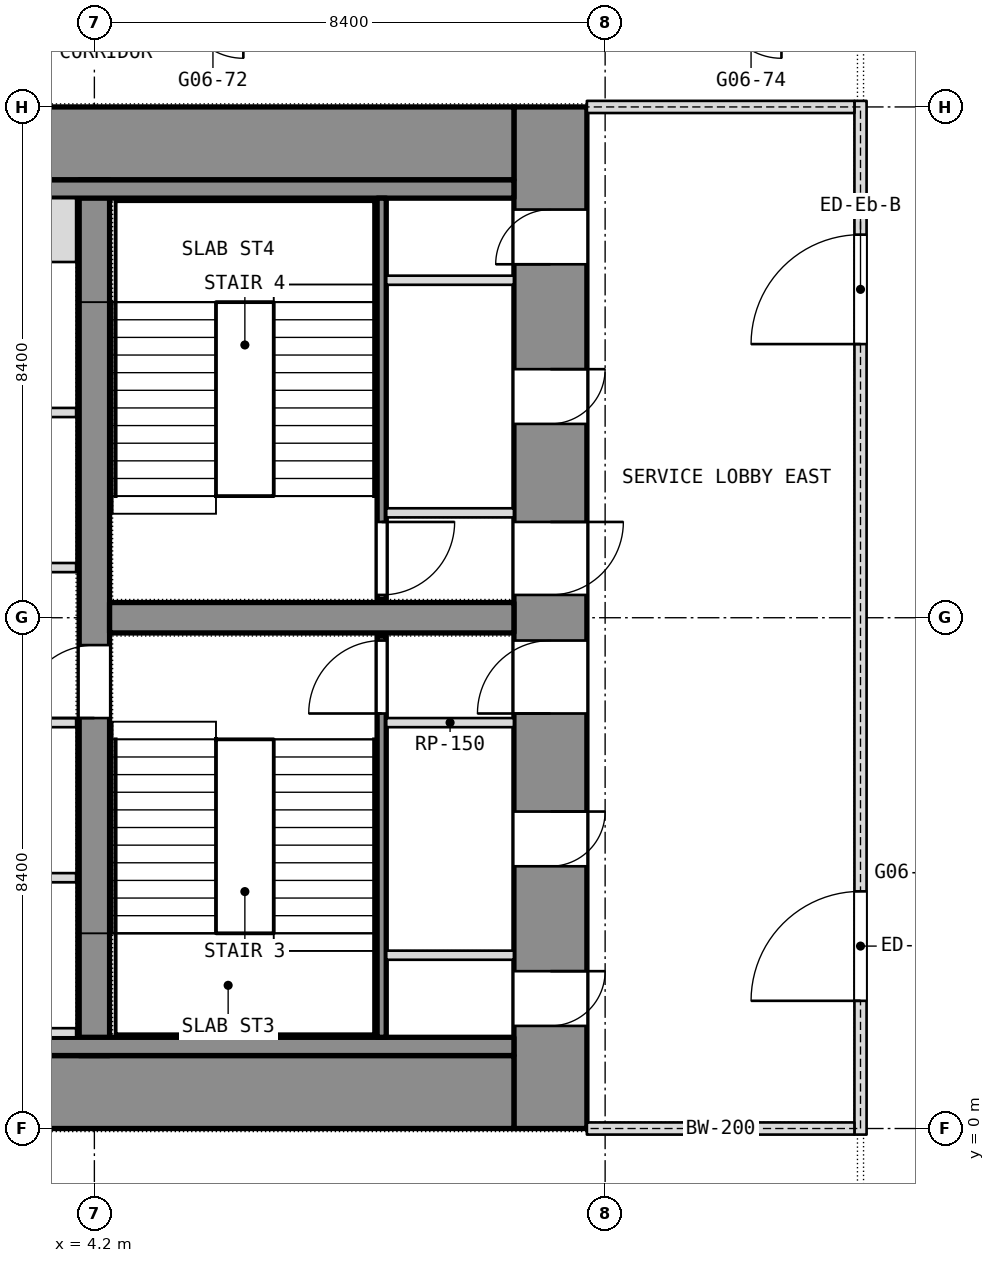
"""IFC4 building model, lengths in metres.
Left out: names, types, materials, properties, quantities, classifications, styles, units other than length and angle.
Written with IfcOpenShell. Run it as: python <this file> out.ifc"""

import sys

from ifc_helpers import new_model, si_unit, direction, frame, frame_2d, origin, place, context, subcontext, project, spatial, rectangle, extrude, element, fill, save


model = new_model("IFC4")
c1 = context("Model", 3, precision=1e-05, world=origin(), true_north=direction((0.0, 1.0)))
c2 = subcontext(c1, "Body", "Model", "MODEL_VIEW")
j1 = project(units=[si_unit("LENGTHUNIT", "METRE"), si_unit("PLANEANGLEUNIT", "RADIAN")], contexts=[c1])
p1 = place(None, origin())
s1 = spatial("IfcSite", under=j1, at=p1, CompositionType="ELEMENT")
p2 = place(p1, origin())
s2 = spatial("IfcBuilding", under=s1, at=p2, CompositionType="ELEMENT")
p3 = place(p2, frame((0.0, 0.0, 72.5)))
s3 = spatial("IfcBuildingStorey", under=s2, at=p3, CompositionType="ELEMENT", Elevation=72.5)
p4 = place(p3, frame((11.7, 0.0, 0.0), z_axis=(0.0, 0.0, 1.0), x_axis=(0.0, 1.0, 0.0)))
e1 = element("IfcWall", 1, at=p4, inside=s3, PredefinedType="SHEAR", context=c2, shape_type="SweptSolid", body=[
    extrude(rectangle(XDim=16.8, YDim=1.2, at=frame_2d((8.4, 0.0))), origin(), (0.0, 0.0, 1.0), 3.6),
])
p5 = place(p4, frame((1.688, 0.0, 0.0)))
e2 = element("IfcOpeningElement", 2, at=p5, cuts=e1, PredefinedType="OPENING", context=c2, shape_type="SweptSolid", body=[
    extrude(rectangle(XDim=0.9, YDim=2.1, at=frame_2d((0.45, 1.05))), frame((0.0, 0.6, 0.0), z_axis=(0.0, -1.0, 0.0), x_axis=(1.0, 0.0, 0.0)), (0.0, 0.0, 1.0), 1.2),
])
p6 = place(p4, frame((4.312, 0.0, 0.0)))
e3 = element("IfcOpeningElement", 3, at=p6, cuts=e1, PredefinedType="OPENING", context=c2, shape_type="SweptSolid", body=[
    extrude(rectangle(XDim=0.9, YDim=2.1, at=frame_2d((0.45, 1.05))), frame((0.0, 0.6, 0.0), z_axis=(0.0, -1.0, 0.0), x_axis=(1.0, 0.0, 0.0)), (0.0, 0.0, 1.0), 1.2),
])
p7 = place(p4, frame((6.825, 0.0, 0.0)))
e4 = element("IfcOpeningElement", 4, at=p7, cuts=e1, PredefinedType="OPENING", context=c2, shape_type="SweptSolid", body=[
    extrude(rectangle(XDim=1.2, YDim=2.1, at=frame_2d((0.6, 1.05))), frame((0.0, 0.6, 0.0), z_axis=(0.0, -1.0, 0.0), x_axis=(1.0, 0.0, 0.0)), (0.0, 0.0, 1.0), 1.2),
])
p8 = place(p4, frame((14.212, 0.0, 0.0)))
e5 = element("IfcOpeningElement", 5, at=p8, cuts=e1, PredefinedType="OPENING", context=c2, shape_type="SweptSolid", body=[
    extrude(rectangle(XDim=0.9, YDim=2.1, at=frame_2d((0.45, 1.05))), frame((0.0, 0.6, 0.0), z_axis=(0.0, -1.0, 0.0), x_axis=(1.0, 0.0, 0.0)), (0.0, 0.0, 1.0), 1.2),
])
p9 = place(p4, frame((11.587, 0.0, 0.0)))
e6 = element("IfcOpeningElement", 6, at=p9, cuts=e1, PredefinedType="OPENING", context=c2, shape_type="SweptSolid", body=[
    extrude(rectangle(XDim=0.9, YDim=2.1, at=frame_2d((0.45, 1.05))), frame((0.0, 0.6, 0.0), z_axis=(0.0, -1.0, 0.0), x_axis=(1.0, 0.0, 0.0)), (0.0, 0.0, 1.0), 1.2),
])
p10 = place(p4, frame((8.775, 0.0, 0.0)))
e7 = element("IfcOpeningElement", 7, at=p10, cuts=e1, PredefinedType="OPENING", context=c2, shape_type="SweptSolid", body=[
    extrude(rectangle(XDim=1.2, YDim=2.1, at=frame_2d((0.6, 1.05))), frame((0.0, 0.6, 0.0), z_axis=(0.0, -1.0, 0.0), x_axis=(1.0, 0.0, 0.0)), (0.0, 0.0, 1.0), 1.2),
])
for number, where, z_axis, x_axis in (
    (8, (-11.1, 0.6, 0.0), (0.0, 0.0, 1.0), (1.0, 0.0, 0.0)),
    (9, (-11.1, 16.2, 0.0), (0.0, 0.0, 1.0), (1.0, 0.0, 0.0)),
):
    element("IfcWall", number, at=place(p3, frame(where, z_axis=z_axis, x_axis=x_axis)), inside=s3, PredefinedType="SHEAR", context=c2, shape_type="SweptSolid", body=[
        extrude(rectangle(XDim=22.2, YDim=1.2, at=frame_2d((11.1, 0.0))), origin(), (0.0, 0.0, 1.0), 3.6),
    ])
p11 = place(p3, frame((4.2, 1.2, 0.0), z_axis=(0.0, 0.0, 1.0), x_axis=(0.0, 1.0, 0.0)))
e10 = element("IfcWall", 10, at=p11, inside=s3, PredefinedType="SHEAR", context=c2, shape_type="SweptSolid", body=[
    extrude(rectangle(XDim=14.4, YDim=0.5, at=frame_2d((7.2, 0.0))), origin(), (0.0, 0.0, 1.0), 3.6),
])
p12 = place(p11, frame((5.55, 0.0, 0.0)))
e11 = element("IfcOpeningElement", 11, at=p12, cuts=e10, PredefinedType="OPENING", context=c2, shape_type="SweptSolid", body=[
    extrude(rectangle(XDim=1.2, YDim=2.1, at=frame_2d((0.6, 1.05))), frame((0.0, 0.25, 0.0), z_axis=(0.0, -1.0, 0.0), x_axis=(1.0, 0.0, 0.0)), (0.0, 0.0, 1.0), 0.5),
])
p13 = place(p3, frame((4.45, 8.4, 0.0), z_axis=(0.0, 0.0, 1.0), x_axis=(1.0, 0.0, 0.0)))
e12 = element("IfcWall", 12, at=p13, inside=s3, PredefinedType="SHEAR", context=c2, shape_type="SweptSolid", body=[
    extrude(rectangle(XDim=6.65, YDim=0.5, at=frame_2d((3.325, 0.0))), origin(), (0.0, 0.0, 1.0), 3.6),
])
for number, where, z_axis, x_axis in (
    (13, (-11.1, 1.35, 0.0), (0.0, 0.0, 1.0), (1.0, 0.0, 0.0)),
    (14, (-11.1, 15.45, 0.0), (0.0, 0.0, 1.0), (1.0, 0.0, 0.0)),
):
    element("IfcWall", number, at=place(p3, frame(where, z_axis=z_axis, x_axis=x_axis)), inside=s3, PredefinedType="PARTITIONING", context=c2, shape_type="SweptSolid", body=[
        extrude(rectangle(XDim=22.2, YDim=0.3, at=frame_2d((11.1, 0.0))), origin(), (0.0, 0.0, 1.0), 3.34),
    ])
p14 = place(p3, frame((8.925, 1.5, 0.0), z_axis=(0.0, 0.0, 1.0), x_axis=(0.0, 1.0, 0.0)))
e15 = element("IfcWall", 15, at=p14, inside=s3, PredefinedType="SHEAR", context=c2, shape_type="SweptSolid", body=[
    extrude(rectangle(XDim=6.6, YDim=0.15, at=frame_2d((3.3, 0.0))), origin(), (0.0, 0.0, 1.0), 3.34),
])
p15 = place(p14, frame((5.325, 0.0, 0.0)))
e16 = element("IfcOpeningElement", 16, at=p15, cuts=e15, PredefinedType="OPENING", context=c2, shape_type="SweptSolid", body=[
    extrude(rectangle(XDim=1.2, YDim=2.1, at=frame_2d((0.6, 1.05))), frame((0.0, 0.075, 0.0), z_axis=(0.0, -1.0, 0.0), x_axis=(1.0, 0.0, 0.0)), (0.0, 0.0, 1.0), 0.15),
])
for number, where, z_axis, x_axis in (
    (17, (9.0, 6.675, 0.0), (0.0, 0.0, 1.0), (1.0, 0.0, 0.0)),
    (18, (9.0, 2.85, 0.0), (0.0, 0.0, 1.0), (1.0, 0.0, 0.0)),
):
    element("IfcWall", number, at=place(p3, frame(where, z_axis=z_axis, x_axis=x_axis)), inside=s3, PredefinedType="PARTITIONING", context=c2, shape_type="SweptSolid", body=[
        extrude(rectangle(XDim=2.1, YDim=0.15, at=frame_2d((1.05, 0.0))), origin(), (0.0, 0.0, 1.0), 3.34),
    ])
p16 = place(p3, frame((8.925, 8.7, 0.0), z_axis=(0.0, 0.0, 1.0), x_axis=(0.0, 1.0, 0.0)))
e19 = element("IfcWall", 19, at=p16, inside=s3, PredefinedType="SHEAR", context=c2, shape_type="SweptSolid", body=[
    extrude(rectangle(XDim=6.6, YDim=0.15, at=frame_2d((3.3, 0.0))), origin(), (0.0, 0.0, 1.0), 3.34),
])
p17 = place(p16, frame((0.075, 0.0, 0.0)))
e20 = element("IfcOpeningElement", 20, at=p17, cuts=e19, PredefinedType="OPENING", context=c2, shape_type="SweptSolid", body=[
    extrude(rectangle(XDim=1.2, YDim=2.1, at=frame_2d((0.6, 1.05))), frame((0.0, 0.075, 0.0), z_axis=(0.0, -1.0, 0.0), x_axis=(1.0, 0.0, 0.0)), (0.0, 0.0, 1.0), 0.15),
])
for number, where, z_axis, x_axis in (
    (21, (9.0, 10.125, 0.0), (0.0, 0.0, 1.0), (1.0, 0.0, 0.0)),
    (22, (9.0, 13.95, 0.0), (0.0, 0.0, 1.0), (1.0, 0.0, 0.0)),
):
    element("IfcWall", number, at=place(p3, frame(where, z_axis=z_axis, x_axis=x_axis)), inside=s3, PredefinedType="PARTITIONING", context=c2, shape_type="SweptSolid", body=[
        extrude(rectangle(XDim=2.1, YDim=0.15, at=frame_2d((1.05, 0.0))), origin(), (0.0, 0.0, 1.0), 3.34),
    ])
p18 = place(p3, frame((-3.9, 4.125, 0.0), z_axis=(0.0, 0.0, 1.0), x_axis=(1.0, 0.0, 0.0)))
e23 = element("IfcWall", 23, at=p18, inside=s3, PredefinedType="PARTITIONING", context=c2, shape_type="SweptSolid", body=[
    extrude(rectangle(XDim=7.8, YDim=0.15, at=frame_2d((3.9, 0.0))), origin(), (0.0, 0.0, 1.0), 3.34),
])
p19 = place(p18, frame((3.75, 0.0, 0.0)))
e24 = element("IfcOpeningElement", 24, at=p19, cuts=e23, PredefinedType="OPENING", context=c2, shape_type="SweptSolid", body=[
    extrude(rectangle(XDim=1.2, YDim=2.1, at=frame_2d((0.6, 1.05))), frame((0.0, 0.075, 0.0), z_axis=(0.0, -1.0, 0.0), x_axis=(1.0, 0.0, 0.0)), (0.0, 0.0, 1.0), 0.15),
])
p20 = place(p3, frame((-3.9, 11.775, 0.0), z_axis=(0.0, 0.0, 1.0), x_axis=(1.0, 0.0, 0.0)))
e25 = element("IfcWall", 25, at=p20, inside=s3, PredefinedType="PARTITIONING", context=c2, shape_type="SweptSolid", body=[
    extrude(rectangle(XDim=7.8, YDim=0.15, at=frame_2d((3.9, 0.0))), origin(), (0.0, 0.0, 1.0), 3.34),
])
p21 = place(p20, frame((3.3, 0.0, 0.0)))
e26 = element("IfcOpeningElement", 26, at=p21, cuts=e25, PredefinedType="OPENING", context=c2, shape_type="SweptSolid", body=[
    extrude(rectangle(XDim=1.2, YDim=2.1, at=frame_2d((0.6, 1.05))), frame((0.0, 0.075, 0.0), z_axis=(0.0, -1.0, 0.0), x_axis=(1.0, 0.0, 0.0)), (0.0, 0.0, 1.0), 0.15),
])
p22 = place(p3, frame((1.65, 1.575, 0.0), z_axis=(0.0, 0.0, 1.0), x_axis=(1.0, 0.0, 0.0)))
e27 = element("IfcWall", 27, at=p22, inside=s3, PredefinedType="SHEAR", context=c2, shape_type="SweptSolid", body=[
    extrude(rectangle(XDim=2.25, YDim=0.15, at=frame_2d((1.125, 0.0))), origin(), (0.0, 0.0, 1.0), 3.6),
])
p23 = place(p3, frame((1.65, 14.775, 0.0), z_axis=(0.0, 0.0, 1.0), x_axis=(1.0, 0.0, 0.0)))
e28 = element("IfcWall", 28, at=p23, inside=s3, PredefinedType="SHEAR", context=c2, shape_type="SweptSolid", body=[
    extrude(rectangle(XDim=2.25, YDim=1.05, at=frame_2d((1.125, 0.0))), origin(), (0.0, 0.0, 1.0), 3.6),
])
for number, where, z_axis, x_axis in (
    (29, (1.65, 6.675, 0.0), (0.0, 0.0, 1.0), (1.0, 0.0, 0.0)),
    (30, (1.65, 9.225, 0.0), (0.0, 0.0, 1.0), (1.0, 0.0, 0.0)),
):
    element("IfcWall", number, at=place(p3, frame(where, z_axis=z_axis, x_axis=x_axis)), inside=s3, PredefinedType="SHEAR", context=c2, shape_type="SweptSolid", body=[
        extrude(rectangle(XDim=2.25, YDim=0.15, at=frame_2d((1.125, 0.0))), origin(), (0.0, 0.0, 1.0), 3.6),
    ])
p24 = place(p3, frame((16.8, -0.1, 0.0), z_axis=(0.0, 0.0, 1.0), x_axis=(0.0, 1.0, 0.0)))
e31 = element("IfcWall", 31, at=p24, inside=s3, PredefinedType="PARTITIONING", context=c2, shape_type="SweptSolid", body=[
    extrude(rectangle(XDim=17.0, YDim=0.2, at=frame_2d((8.5, 0.0))), origin(), (0.0, 0.0, 1.0), 3.34),
])
p25 = place(p24, frame((2.2, 0.0, 0.0)))
e32 = element("IfcOpeningElement", 32, at=p25, cuts=e31, PredefinedType="OPENING", context=c2, shape_type="SweptSolid", body=[
    extrude(rectangle(XDim=1.8, YDim=2.1, at=frame_2d((0.9, 1.05))), frame((0.0, 0.1, 0.0), z_axis=(0.0, -1.0, 0.0), x_axis=(1.0, 0.0, 0.0)), (0.0, 0.0, 1.0), 0.2),
])
p26 = place(p24, frame((13.0, 0.0, 0.0)))
e33 = element("IfcOpeningElement", 33, at=p26, cuts=e31, PredefinedType="OPENING", context=c2, shape_type="SweptSolid", body=[
    extrude(rectangle(XDim=1.8, YDim=2.1, at=frame_2d((0.9, 1.05))), frame((0.0, 0.1, 0.0), z_axis=(0.0, -1.0, 0.0), x_axis=(1.0, 0.0, 0.0)), (0.0, 0.0, 1.0), 0.2),
])
for number, where, z_axis, x_axis in (
    (34, (12.3, 0.0, 0.0), (0.0, 0.0, 1.0), (1.0, 0.0, 0.0)),
    (35, (12.3, 16.8, 0.0), (0.0, 0.0, 1.0), (1.0, 0.0, 0.0)),
):
    element("IfcWall", number, at=place(p3, frame(where, z_axis=z_axis, x_axis=x_axis)), inside=s3, PredefinedType="PARTITIONING", context=c2, shape_type="SweptSolid", body=[
        extrude(rectangle(XDim=4.4, YDim=0.2, at=frame_2d((2.2, 0.0))), origin(), (0.0, 0.0, 1.0), 2.84),
    ])
p27 = place(p5, origin())
e36 = element("IfcDoor", 36, at=p27, inside=s3, OperationType="SINGLE_SWING_LEFT", PredefinedType="DOOR", context=c2, shape_type="SweptSolid", body=[
    extrude(rectangle(XDim=0.9, YDim=2.1, at=frame_2d((0.45, 1.05))), frame((0.0, 0.025, 0.0), z_axis=(0.0, -1.0, 0.0), x_axis=(1.0, 0.0, 0.0)), (0.0, 0.0, 1.0), 0.05),
])
fill(e2, e36)
p28 = place(p6, origin())
e37 = element("IfcDoor", 37, at=p28, inside=s3, OperationType="SINGLE_SWING_LEFT", PredefinedType="DOOR", context=c2, shape_type="SweptSolid", body=[
    extrude(rectangle(XDim=0.9, YDim=2.1, at=frame_2d((0.45, 1.05))), frame((0.0, 0.025, 0.0), z_axis=(0.0, -1.0, 0.0), x_axis=(1.0, 0.0, 0.0)), (0.0, 0.0, 1.0), 0.05),
])
fill(e3, e37)
p29 = place(p7, origin())
e38 = element("IfcDoor", 38, at=p29, inside=s3, OperationType="SINGLE_SWING_LEFT", PredefinedType="DOOR", context=c2, shape_type="SweptSolid", body=[
    extrude(rectangle(XDim=1.2, YDim=2.1, at=frame_2d((0.6, 1.05))), frame((0.0, 0.025, 0.0), z_axis=(0.0, -1.0, 0.0), x_axis=(1.0, 0.0, 0.0)), (0.0, 0.0, 1.0), 0.05),
])
fill(e4, e38)
p30 = place(p15, origin())
e39 = element("IfcDoor", 39, at=p30, inside=s3, OperationType="SINGLE_SWING_LEFT", PredefinedType="DOOR", context=c2, shape_type="SweptSolid", body=[
    extrude(rectangle(XDim=1.2, YDim=2.1, at=frame_2d((0.6, 1.05))), frame((0.0, 0.025, 0.0), z_axis=(0.0, -1.0, 0.0), x_axis=(1.0, 0.0, 0.0)), (0.0, 0.0, 1.0), 0.05),
])
fill(e16, e39)
p31 = place(p8, origin())
e40 = element("IfcDoor", 40, at=p31, inside=s3, OperationType="SINGLE_SWING_LEFT", PredefinedType="DOOR", context=c2, shape_type="SweptSolid", body=[
    extrude(rectangle(XDim=0.9, YDim=2.1, at=frame_2d((0.45, 1.05))), frame((0.0, 0.025, 0.0), z_axis=(0.0, -1.0, 0.0), x_axis=(1.0, 0.0, 0.0)), (0.0, 0.0, 1.0), 0.05),
])
fill(e5, e40)
p32 = place(p9, origin())
e41 = element("IfcDoor", 41, at=p32, inside=s3, OperationType="SINGLE_SWING_LEFT", PredefinedType="DOOR", context=c2, shape_type="SweptSolid", body=[
    extrude(rectangle(XDim=0.9, YDim=2.1, at=frame_2d((0.45, 1.05))), frame((0.0, 0.025, 0.0), z_axis=(0.0, -1.0, 0.0), x_axis=(1.0, 0.0, 0.0)), (0.0, 0.0, 1.0), 0.05),
])
fill(e6, e41)
p33 = place(p10, origin())
e42 = element("IfcDoor", 42, at=p33, inside=s3, OperationType="SINGLE_SWING_LEFT", PredefinedType="DOOR", context=c2, shape_type="SweptSolid", body=[
    extrude(rectangle(XDim=1.2, YDim=2.1, at=frame_2d((0.6, 1.05))), frame((0.0, 0.025, 0.0), z_axis=(0.0, -1.0, 0.0), x_axis=(1.0, 0.0, 0.0)), (0.0, 0.0, 1.0), 0.05),
])
fill(e7, e42)
p34 = place(p17, origin())
e43 = element("IfcDoor", 43, at=p34, inside=s3, OperationType="SINGLE_SWING_LEFT", PredefinedType="DOOR", context=c2, shape_type="SweptSolid", body=[
    extrude(rectangle(XDim=1.2, YDim=2.1, at=frame_2d((0.6, 1.05))), frame((0.0, 0.025, 0.0), z_axis=(0.0, -1.0, 0.0), x_axis=(1.0, 0.0, 0.0)), (0.0, 0.0, 1.0), 0.05),
])
fill(e20, e43)
p35 = place(p12, origin())
e44 = element("IfcDoor", 44, at=p35, inside=s3, OperationType="SINGLE_SWING_LEFT", PredefinedType="DOOR", context=c2, shape_type="SweptSolid", body=[
    extrude(rectangle(XDim=1.2, YDim=2.1, at=frame_2d((0.6, 1.05))), frame((0.0, 0.025, 0.0), z_axis=(0.0, -1.0, 0.0), x_axis=(1.0, 0.0, 0.0)), (0.0, 0.0, 1.0), 0.05),
])
fill(e11, e44)
p36 = place(p25, origin())
e45 = element("IfcDoor", 45, at=p36, inside=s3, OperationType="DOUBLE_DOOR_SINGLE_SWING", PredefinedType="DOOR", context=c2, shape_type="SweptSolid", body=[
    extrude(rectangle(XDim=1.8, YDim=2.1, at=frame_2d((0.9, 1.05))), frame((0.0, 0.025, 0.0), z_axis=(0.0, -1.0, 0.0), x_axis=(1.0, 0.0, 0.0)), (0.0, 0.0, 1.0), 0.05),
])
fill(e32, e45)
p37 = place(p26, origin())
e46 = element("IfcDoor", 46, at=p37, inside=s3, OperationType="DOUBLE_DOOR_SINGLE_SWING", PredefinedType="DOOR", context=c2, shape_type="SweptSolid", body=[
    extrude(rectangle(XDim=1.8, YDim=2.1, at=frame_2d((0.9, 1.05))), frame((0.0, 0.025, 0.0), z_axis=(0.0, -1.0, 0.0), x_axis=(1.0, 0.0, 0.0)), (0.0, 0.0, 1.0), 0.05),
])
fill(e33, e46)
save(model, sys.argv[1])
